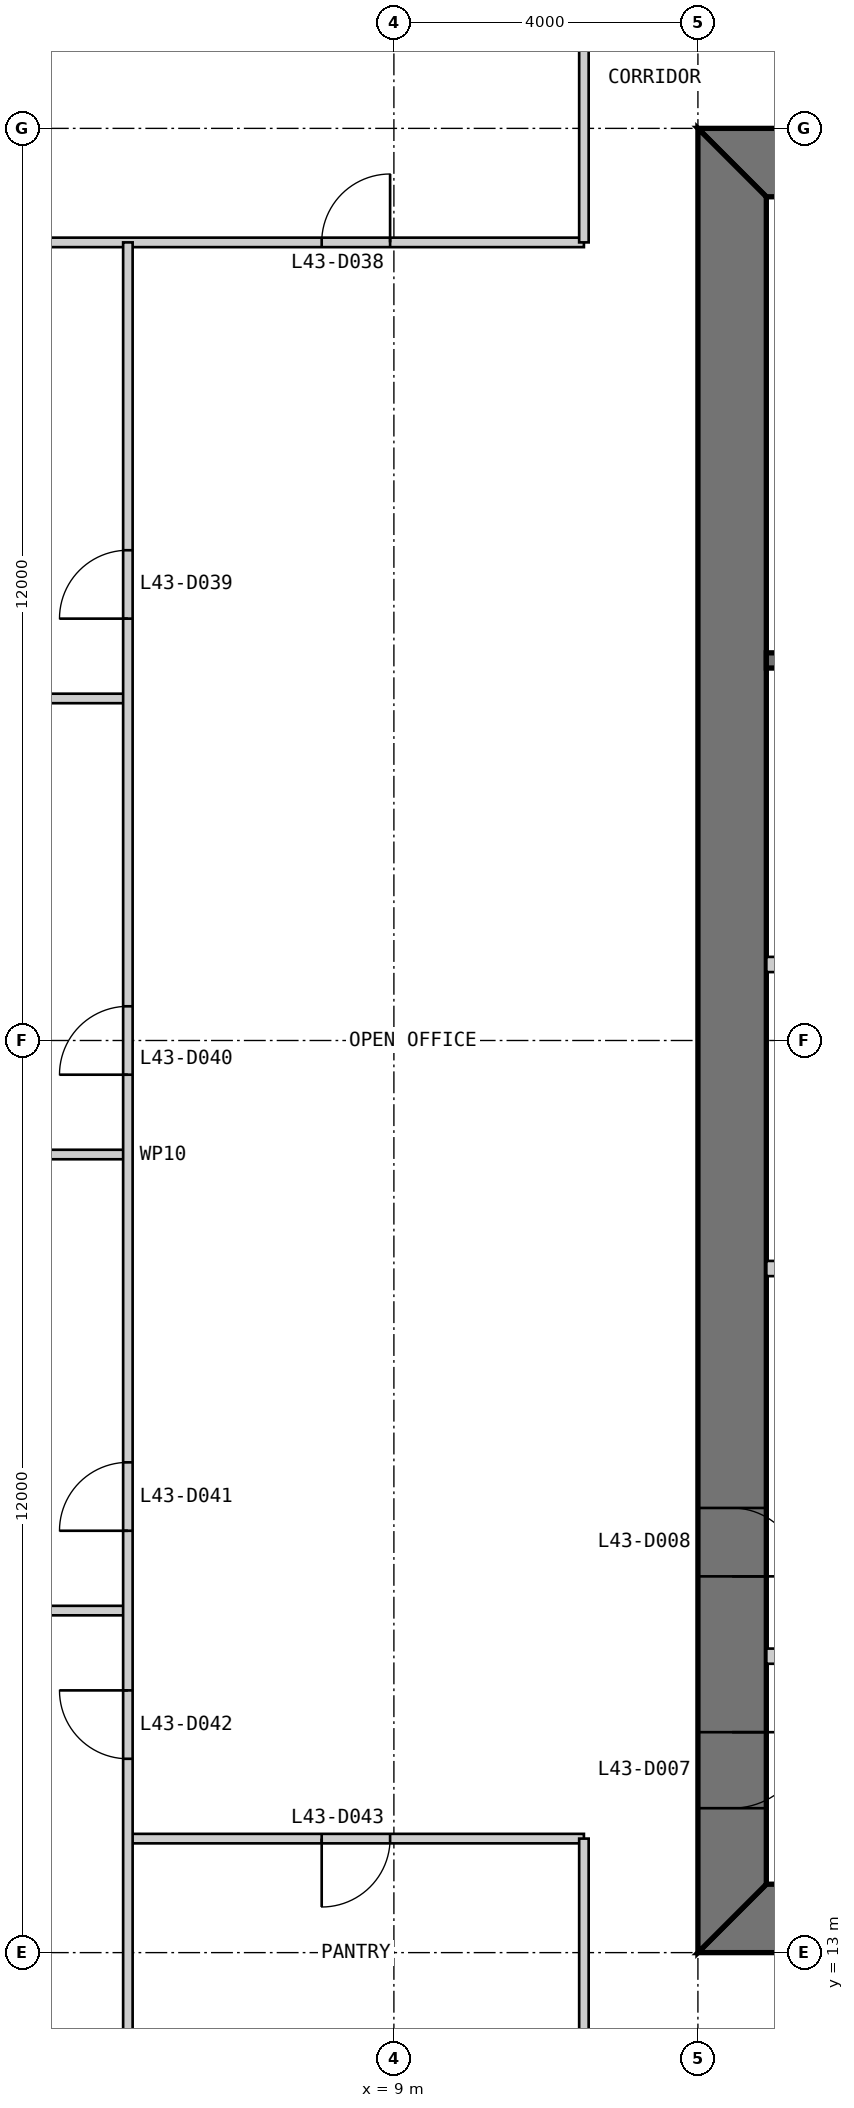
"""IFC4 building model, lengths in metres.
Left out: names, types, materials, properties, quantities, classifications, styles, units other than length and angle.
Written with IfcOpenShell. Run it as: python <this file> out.ifc"""

import sys

from ifc_helpers import new_model, si_unit, direction, frame, frame_2d, origin, place, context, subcontext, project, spatial, polyline, rectangle, outline, extrude, element, fill, save


model = new_model("IFC4")
c1 = context("Model", 3, precision=1e-05, world=origin(), true_north=direction((0.0, 1.0)))
c2 = subcontext(c1, "Body", "Model", "MODEL_VIEW")
j1 = project(units=[si_unit("LENGTHUNIT", "METRE"), si_unit("PLANEANGLEUNIT", "RADIAN")], contexts=[c1])
p1 = place(None, origin())
s1 = spatial("IfcSite", under=j1, at=p1, CompositionType="ELEMENT")
p2 = place(p1, origin())
s2 = spatial("IfcBuilding", under=s1, at=p2, CompositionType="ELEMENT")
p3 = place(p2, frame((0.0, 0.0, 185.8)))
s3 = spatial("IfcBuildingStorey", under=s2, at=p3, CompositionType="ELEMENT", Elevation=185.8)
p4 = place(p3, frame((13.0, 13.45, 0.0), z_axis=(0.0, 0.0, 1.0), x_axis=(1.0, 0.0, 0.0)))
e1 = element("IfcWall", 1, at=p4, inside=s3, PredefinedType="SHEAR", context=c2, shape_type="SweptSolid", body=[
    extrude(outline(polyline([(0.0, -0.45), (24.0, -0.45), (23.1, 0.45), (0.9, 0.45), (0.0, -0.45)])), origin(), (0.0, 0.0, 1.0), 4.0),
])
p5 = place(p4, frame((4.9, 0.0, 0.0)))
e2 = element("IfcOpeningElement", 2, at=p5, cuts=e1, PredefinedType="OPENING", context=c2, shape_type="SweptSolid", body=[
    extrude(rectangle(XDim=1.0, YDim=2.2, at=frame_2d((0.5, 1.1))), frame((0.0, 0.46, 0.0), z_axis=(0.0, -1.0, 0.0), x_axis=(1.0, 0.0, 0.0)), (0.0, 0.0, 1.0), 0.92),
])
p6 = place(p4, frame((8.9, 0.0, 0.0)))
e3 = element("IfcOpeningElement", 3, at=p6, cuts=e1, PredefinedType="OPENING", context=c2, shape_type="SweptSolid", body=[
    extrude(rectangle(XDim=1.1, YDim=2.2, at=frame_2d((0.55, 1.1))), frame((0.0, 0.46, 0.0), z_axis=(0.0, -1.0, 0.0), x_axis=(1.0, 0.0, 0.0)), (0.0, 0.0, 1.0), 0.92),
])
p7 = place(p4, frame((15.05, 0.0, 0.0)))
e4 = element("IfcOpeningElement", 4, at=p7, cuts=e1, PredefinedType="OPENING", context=c2, shape_type="SweptSolid", body=[
    extrude(rectangle(XDim=0.9, YDim=2.2, at=frame_2d((0.45, 1.1))), frame((0.0, 0.46, 0.0), z_axis=(0.0, -1.0, 0.0), x_axis=(1.0, 0.0, 0.0)), (0.0, 0.0, 1.0), 0.92),
])
p8 = place(p4, frame((17.9, 0.0, 0.0)))
e5 = element("IfcOpeningElement", 5, at=p8, cuts=e1, PredefinedType="OPENING", context=c2, shape_type="SweptSolid", body=[
    extrude(rectangle(XDim=1.0, YDim=2.2, at=frame_2d((0.5, 1.1))), frame((0.0, 0.46, 0.0), z_axis=(0.0, -1.0, 0.0), x_axis=(1.0, 0.0, 0.0)), (0.0, 0.0, 1.0), 0.92),
])
p9 = place(p4, frame((21.4, 0.0, 0.0)))
e6 = element("IfcOpeningElement", 6, at=p9, cuts=e1, PredefinedType="OPENING", context=c2, shape_type="SweptSolid", body=[
    extrude(rectangle(XDim=1.0, YDim=2.2, at=frame_2d((0.5, 1.1))), frame((0.0, 0.46, 0.0), z_axis=(0.0, -1.0, 0.0), x_axis=(1.0, 0.0, 0.0)), (0.0, 0.0, 1.0), 0.92),
])
p10 = place(p3, frame((37.0, 36.55, 0.0), z_axis=(0.0, 0.0, 1.0), x_axis=(-1.0, 0.0, 0.0)))
e7 = element("IfcWall", 7, at=p10, inside=s3, PredefinedType="SHEAR", context=c2, shape_type="SweptSolid", body=[
    extrude(outline(polyline([(0.0, -0.45), (24.0, -0.45), (23.1, 0.45), (0.9, 0.45), (0.0, -0.45)])), origin(), (0.0, 0.0, 1.0), 4.0),
])
p11 = place(p10, frame((4.9, 0.0, 0.0)))
e8 = element("IfcOpeningElement", 8, at=p11, cuts=e7, PredefinedType="OPENING", context=c2, shape_type="SweptSolid", body=[
    extrude(rectangle(XDim=1.0, YDim=2.2, at=frame_2d((0.5, 1.1))), frame((0.0, 0.46, 0.0), z_axis=(0.0, -1.0, 0.0), x_axis=(1.0, 0.0, 0.0)), (0.0, 0.0, 1.0), 0.92),
])
p12 = place(p10, frame((8.9, 0.0, 0.0)))
e9 = element("IfcOpeningElement", 9, at=p12, cuts=e7, PredefinedType="OPENING", context=c2, shape_type="SweptSolid", body=[
    extrude(rectangle(XDim=1.1, YDim=2.2, at=frame_2d((0.55, 1.1))), frame((0.0, 0.46, 0.0), z_axis=(0.0, -1.0, 0.0), x_axis=(1.0, 0.0, 0.0)), (0.0, 0.0, 1.0), 0.92),
])
p13 = place(p10, frame((15.05, 0.0, 0.0)))
e10 = element("IfcOpeningElement", 10, at=p13, cuts=e7, PredefinedType="OPENING", context=c2, shape_type="SweptSolid", body=[
    extrude(rectangle(XDim=0.9, YDim=2.2, at=frame_2d((0.45, 1.1))), frame((0.0, 0.46, 0.0), z_axis=(0.0, -1.0, 0.0), x_axis=(1.0, 0.0, 0.0)), (0.0, 0.0, 1.0), 0.92),
])
p14 = place(p10, frame((17.9, 0.0, 0.0)))
e11 = element("IfcOpeningElement", 11, at=p14, cuts=e7, PredefinedType="OPENING", context=c2, shape_type="SweptSolid", body=[
    extrude(rectangle(XDim=1.0, YDim=2.2, at=frame_2d((0.5, 1.1))), frame((0.0, 0.46, 0.0), z_axis=(0.0, -1.0, 0.0), x_axis=(1.0, 0.0, 0.0)), (0.0, 0.0, 1.0), 0.92),
])
p15 = place(p10, frame((21.4, 0.0, 0.0)))
e12 = element("IfcOpeningElement", 12, at=p15, cuts=e7, PredefinedType="OPENING", context=c2, shape_type="SweptSolid", body=[
    extrude(rectangle(XDim=1.0, YDim=2.2, at=frame_2d((0.5, 1.1))), frame((0.0, 0.46, 0.0), z_axis=(0.0, -1.0, 0.0), x_axis=(1.0, 0.0, 0.0)), (0.0, 0.0, 1.0), 0.92),
])
p16 = place(p3, frame((13.45, 36.1, 0.0), z_axis=(0.0, 0.0, 1.0), x_axis=(0.0, -1.0, 0.0)))
e13 = element("IfcWall", 13, at=p16, inside=s3, PredefinedType="SHEAR", context=c2, shape_type="SweptSolid", body=[
    extrude(outline(polyline([(-0.9, -0.45), (23.1, -0.45), (22.2, 0.45), (0.0, 0.45), (-0.9, -0.45)])), origin(), (0.0, 0.0, 1.0), 4.0),
])
p17 = place(p16, frame((20.2, 0.0, 0.0)))
e14 = element("IfcOpeningElement", 14, at=p17, cuts=e13, PredefinedType="OPENING", context=c2, shape_type="SweptSolid", body=[
    extrude(rectangle(XDim=1.0, YDim=2.2, at=frame_2d((0.5, 1.1))), frame((0.0, 0.46, 0.0), z_axis=(0.0, -1.0, 0.0), x_axis=(1.0, 0.0, 0.0)), (0.0, 0.0, 1.0), 0.92),
])
p18 = place(p16, frame((17.25, 0.0, 0.0)))
e15 = element("IfcOpeningElement", 15, at=p18, cuts=e13, PredefinedType="OPENING", context=c2, shape_type="SweptSolid", body=[
    extrude(rectangle(XDim=0.9, YDim=2.2, at=frame_2d((0.45, 1.1))), frame((0.0, 0.46, 0.0), z_axis=(0.0, -1.0, 0.0), x_axis=(1.0, 0.0, 0.0)), (0.0, 0.0, 1.0), 0.92),
])
for number, where, z_axis, x_axis in (
    (16, (13.9, 16.9, 0.0), (0.0, 0.0, 1.0), (1.0, 0.0, 0.0)),
    (17, (13.9, 22.0, 0.0), (0.0, 0.0, 1.0), (1.0, 0.0, 0.0)),
    (18, (13.9, 26.0, 0.0), (0.0, 0.0, 1.0), (1.0, 0.0, 0.0)),
):
    element("IfcWall", number, at=place(p3, frame(where, z_axis=z_axis, x_axis=x_axis)), inside=s3, PredefinedType="PARTITIONING", context=c2, shape_type="SweptSolid", body=[
        extrude(rectangle(XDim=2.8, YDim=0.2, at=frame_2d((1.4, 0.0))), origin(), (0.0, 0.0, 1.0), 3.8),
    ])
p19 = place(p3, frame((29.7, 30.0, 0.0), z_axis=(0.0, 0.0, 1.0), x_axis=(-1.0, 0.0, 0.0)))
e19 = element("IfcWall", 19, at=p19, inside=s3, PredefinedType="SOLIDWALL", context=c2, shape_type="SweptSolid", body=[
    extrude(rectangle(XDim=15.8, YDim=0.2, at=frame_2d((7.9, 0.0))), origin(), (0.0, 0.0, 1.0), 3.8),
])
p20 = place(p3, frame((0.15, 35.5, 0.0), z_axis=(0.0, 0.0, 1.0), x_axis=(1.0, 0.0, 0.0)))
e20 = element("IfcWall", 20, at=p20, inside=s3, PredefinedType="PARTITIONING", context=c2, shape_type="SweptSolid", body=[
    extrude(rectangle(XDim=11.35, YDim=0.125, at=frame_2d((5.675, 0.0))), origin(), (0.0, 0.0, 1.0), 3.85),
])
p21 = place(p20, frame((7.9, 0.0, 0.0)))
e21 = element("IfcOpeningElement", 21, at=p21, cuts=e20, PredefinedType="OPENING", context=c2, shape_type="SweptSolid", body=[
    extrude(rectangle(XDim=0.9, YDim=2.2, at=frame_2d((0.45, 1.1))), frame((0.0, 0.073, 0.0), z_axis=(0.0, -1.0, 0.0), x_axis=(1.0, 0.0, 0.0)), (0.0, 0.0, 1.0), 0.145),
])
for number, where, z_axis, x_axis in (
    (22, (0.15, 29.5, 0.0), (0.0, 0.0, 1.0), (1.0, 0.0, 0.0)),
    (23, (0.15, 23.5, 0.0), (0.0, 0.0, 1.0), (1.0, 0.0, 0.0)),
    (24, (0.15, 17.5, 0.0), (0.0, 0.0, 1.0), (1.0, 0.0, 0.0)),
):
    element("IfcWall", number, at=place(p3, frame(where, z_axis=z_axis, x_axis=x_axis)), inside=s3, PredefinedType="PARTITIONING", context=c2, shape_type="SweptSolid", body=[
        extrude(rectangle(XDim=5.35, YDim=0.125, at=frame_2d((2.675, 0.0))), origin(), (0.0, 0.0, 1.0), 3.85),
    ])
p22 = place(p3, frame((5.5, 14.5, 0.0), z_axis=(0.0, 0.0, 1.0), x_axis=(1.0, 0.0, 0.0)))
e25 = element("IfcWall", 25, at=p22, inside=s3, PredefinedType="PARTITIONING", context=c2, shape_type="SweptSolid", body=[
    extrude(rectangle(XDim=6.0, YDim=0.125, at=frame_2d((3.0, 0.0))), origin(), (0.0, 0.0, 1.0), 3.85),
])
p23 = place(p22, frame((2.55, 0.0, 0.0)))
e26 = element("IfcOpeningElement", 26, at=p23, cuts=e25, PredefinedType="OPENING", context=c2, shape_type="SweptSolid", body=[
    extrude(rectangle(XDim=0.9, YDim=2.2, at=frame_2d((0.45, 1.1))), frame((0.0, 0.073, 0.0), z_axis=(0.0, -1.0, 0.0), x_axis=(1.0, 0.0, 0.0)), (0.0, 0.0, 1.0), 0.145),
])
p24 = place(p3, frame((5.5, 35.5, 0.0), z_axis=(0.0, 0.0, 1.0), x_axis=(0.0, -1.0, 0.0)))
e27 = element("IfcWall", 27, at=p24, inside=s3, PredefinedType="PARTITIONING", context=c2, shape_type="SweptSolid", body=[
    extrude(rectangle(XDim=24.0, YDim=0.125, at=frame_2d((12.0, 0.0))), origin(), (0.0, 0.0, 1.0), 3.85),
])
p25 = place(p24, frame((4.05, 0.0, 0.0)))
e28 = element("IfcOpeningElement", 28, at=p25, cuts=e27, PredefinedType="OPENING", context=c2, shape_type="SweptSolid", body=[
    extrude(rectangle(XDim=0.9, YDim=2.2, at=frame_2d((0.45, 1.1))), frame((0.0, 0.073, 0.0), z_axis=(0.0, -1.0, 0.0), x_axis=(1.0, 0.0, 0.0)), (0.0, 0.0, 1.0), 0.145),
])
p26 = place(p24, frame((10.05, 0.0, 0.0)))
e29 = element("IfcOpeningElement", 29, at=p26, cuts=e27, PredefinedType="OPENING", context=c2, shape_type="SweptSolid", body=[
    extrude(rectangle(XDim=0.9, YDim=2.2, at=frame_2d((0.45, 1.1))), frame((0.0, 0.073, 0.0), z_axis=(0.0, -1.0, 0.0), x_axis=(1.0, 0.0, 0.0)), (0.0, 0.0, 1.0), 0.145),
])
p27 = place(p24, frame((16.05, 0.0, 0.0)))
e30 = element("IfcOpeningElement", 30, at=p27, cuts=e27, PredefinedType="OPENING", context=c2, shape_type="SweptSolid", body=[
    extrude(rectangle(XDim=0.9, YDim=2.2, at=frame_2d((0.45, 1.1))), frame((0.0, 0.073, 0.0), z_axis=(0.0, -1.0, 0.0), x_axis=(1.0, 0.0, 0.0)), (0.0, 0.0, 1.0), 0.145),
])
p28 = place(p24, frame((19.05, 0.0, 0.0)))
e31 = element("IfcOpeningElement", 31, at=p28, cuts=e27, PredefinedType="OPENING", context=c2, shape_type="SweptSolid", body=[
    extrude(rectangle(XDim=0.9, YDim=2.2, at=frame_2d((0.45, 1.1))), frame((0.0, 0.073, 0.0), z_axis=(0.0, -1.0, 0.0), x_axis=(1.0, 0.0, 0.0)), (0.0, 0.0, 1.0), 0.145),
])
for number, where, z_axis, x_axis in (
    (32, (11.5, 38.5, 0.0), (0.0, 0.0, 1.0), (0.0, -1.0, 0.0)),
    (33, (11.5, 14.5, 0.0), (0.0, 0.0, 1.0), (0.0, -1.0, 0.0)),
):
    element("IfcWall", number, at=place(p3, frame(where, z_axis=z_axis, x_axis=x_axis)), inside=s3, PredefinedType="PARTITIONING", context=c2, shape_type="SweptSolid", body=[
        extrude(rectangle(XDim=3.0, YDim=0.125, at=frame_2d((1.5, 0.0))), origin(), (0.0, 0.0, 1.0), 3.85),
    ])
p29 = place(p17, origin())
e34 = element("IfcDoor", 34, at=p29, inside=s3, OperationType="SINGLE_SWING_LEFT", PredefinedType="DOOR", context=c2, shape_type="SweptSolid", body=[
    extrude(rectangle(XDim=1.0, YDim=2.2, at=frame_2d((0.5, 1.1))), frame((0.0, 0.025, 0.0), z_axis=(0.0, -1.0, 0.0), x_axis=(1.0, 0.0, 0.0)), (0.0, 0.0, 1.0), 0.05),
    extrude(outline(polyline([(0.0, 0.0), (0.04, 0.0), (0.04, 2.16), (0.96, 2.16), (0.96, 0.0), (1.0, 0.0), (1.0, 2.2), (0.0, 2.2), (0.0, 0.0)])), frame((0.0, 0.3, 0.0), z_axis=(0.0, -1.0, 0.0), x_axis=(1.0, 0.0, 0.0)), (0.0, 0.0, 1.0), 0.6),
])
fill(e14, e34)
p30 = place(p18, origin())
e35 = element("IfcDoor", 35, at=p30, inside=s3, OperationType="SINGLE_SWING_RIGHT", PredefinedType="DOOR", context=c2, shape_type="SweptSolid", body=[
    extrude(rectangle(XDim=0.9, YDim=2.2, at=frame_2d((0.45, 1.1))), frame((0.0, 0.025, 0.0), z_axis=(0.0, -1.0, 0.0), x_axis=(1.0, 0.0, 0.0)), (0.0, 0.0, 1.0), 0.05),
    extrude(outline(polyline([(0.0, 0.0), (0.04, 0.0), (0.04, 2.16), (0.86, 2.16), (0.86, 0.0), (0.9, 0.0), (0.9, 2.2), (0.0, 2.2), (0.0, 0.0)])), frame((0.0, 0.3, 0.0), z_axis=(0.0, -1.0, 0.0), x_axis=(1.0, 0.0, 0.0)), (0.0, 0.0, 1.0), 0.6),
])
fill(e15, e35)
p31 = place(p21, origin())
e36 = element("IfcDoor", 36, at=p31, inside=s3, OperationType="SINGLE_SWING_RIGHT", PredefinedType="DOOR", context=c2, shape_type="SweptSolid", body=[
    extrude(rectangle(XDim=0.9, YDim=2.2, at=frame_2d((0.45, 1.1))), frame((0.0, 0.025, 0.0), z_axis=(0.0, -1.0, 0.0), x_axis=(1.0, 0.0, 0.0)), (0.0, 0.0, 1.0), 0.05),
])
fill(e21, e36)
p32 = place(p25, frame((0.9, 0.0, 0.0), z_axis=(0.0, 0.0, 1.0), x_axis=(-1.0, 0.0, 0.0)))
e37 = element("IfcDoor", 37, at=p32, inside=s3, OperationType="SINGLE_SWING_LEFT", PredefinedType="DOOR", context=c2, shape_type="SweptSolid", body=[
    extrude(rectangle(XDim=0.9, YDim=2.2, at=frame_2d((0.45, 1.1))), frame((0.0, 0.025, 0.0), z_axis=(0.0, -1.0, 0.0), x_axis=(1.0, 0.0, 0.0)), (0.0, 0.0, 1.0), 0.05),
])
fill(e28, e37)
p33 = place(p26, frame((0.9, 0.0, 0.0), z_axis=(0.0, 0.0, 1.0), x_axis=(-1.0, 0.0, 0.0)))
e38 = element("IfcDoor", 38, at=p33, inside=s3, OperationType="SINGLE_SWING_LEFT", PredefinedType="DOOR", context=c2, shape_type="SweptSolid", body=[
    extrude(rectangle(XDim=0.9, YDim=2.2, at=frame_2d((0.45, 1.1))), frame((0.0, 0.025, 0.0), z_axis=(0.0, -1.0, 0.0), x_axis=(1.0, 0.0, 0.0)), (0.0, 0.0, 1.0), 0.05),
])
fill(e29, e38)
p34 = place(p27, frame((0.9, 0.0, 0.0), z_axis=(0.0, 0.0, 1.0), x_axis=(-1.0, 0.0, 0.0)))
e39 = element("IfcDoor", 39, at=p34, inside=s3, OperationType="SINGLE_SWING_LEFT", PredefinedType="DOOR", context=c2, shape_type="SweptSolid", body=[
    extrude(rectangle(XDim=0.9, YDim=2.2, at=frame_2d((0.45, 1.1))), frame((0.0, 0.025, 0.0), z_axis=(0.0, -1.0, 0.0), x_axis=(1.0, 0.0, 0.0)), (0.0, 0.0, 1.0), 0.05),
])
fill(e30, e39)
p35 = place(p28, frame((0.9, 0.0, 0.0), z_axis=(0.0, 0.0, 1.0), x_axis=(-1.0, 0.0, 0.0)))
e40 = element("IfcDoor", 40, at=p35, inside=s3, OperationType="SINGLE_SWING_RIGHT", PredefinedType="DOOR", context=c2, shape_type="SweptSolid", body=[
    extrude(rectangle(XDim=0.9, YDim=2.2, at=frame_2d((0.45, 1.1))), frame((0.0, 0.025, 0.0), z_axis=(0.0, -1.0, 0.0), x_axis=(1.0, 0.0, 0.0)), (0.0, 0.0, 1.0), 0.05),
])
fill(e31, e40)
p36 = place(p23, frame((0.9, 0.0, 0.0), z_axis=(0.0, 0.0, 1.0), x_axis=(-1.0, 0.0, 0.0)))
e41 = element("IfcDoor", 41, at=p36, inside=s3, OperationType="SINGLE_SWING_RIGHT", PredefinedType="DOOR", context=c2, shape_type="SweptSolid", body=[
    extrude(rectangle(XDim=0.9, YDim=2.2, at=frame_2d((0.45, 1.1))), frame((0.0, 0.025, 0.0), z_axis=(0.0, -1.0, 0.0), x_axis=(1.0, 0.0, 0.0)), (0.0, 0.0, 1.0), 0.05),
])
fill(e26, e41)
save(model, sys.argv[1])
